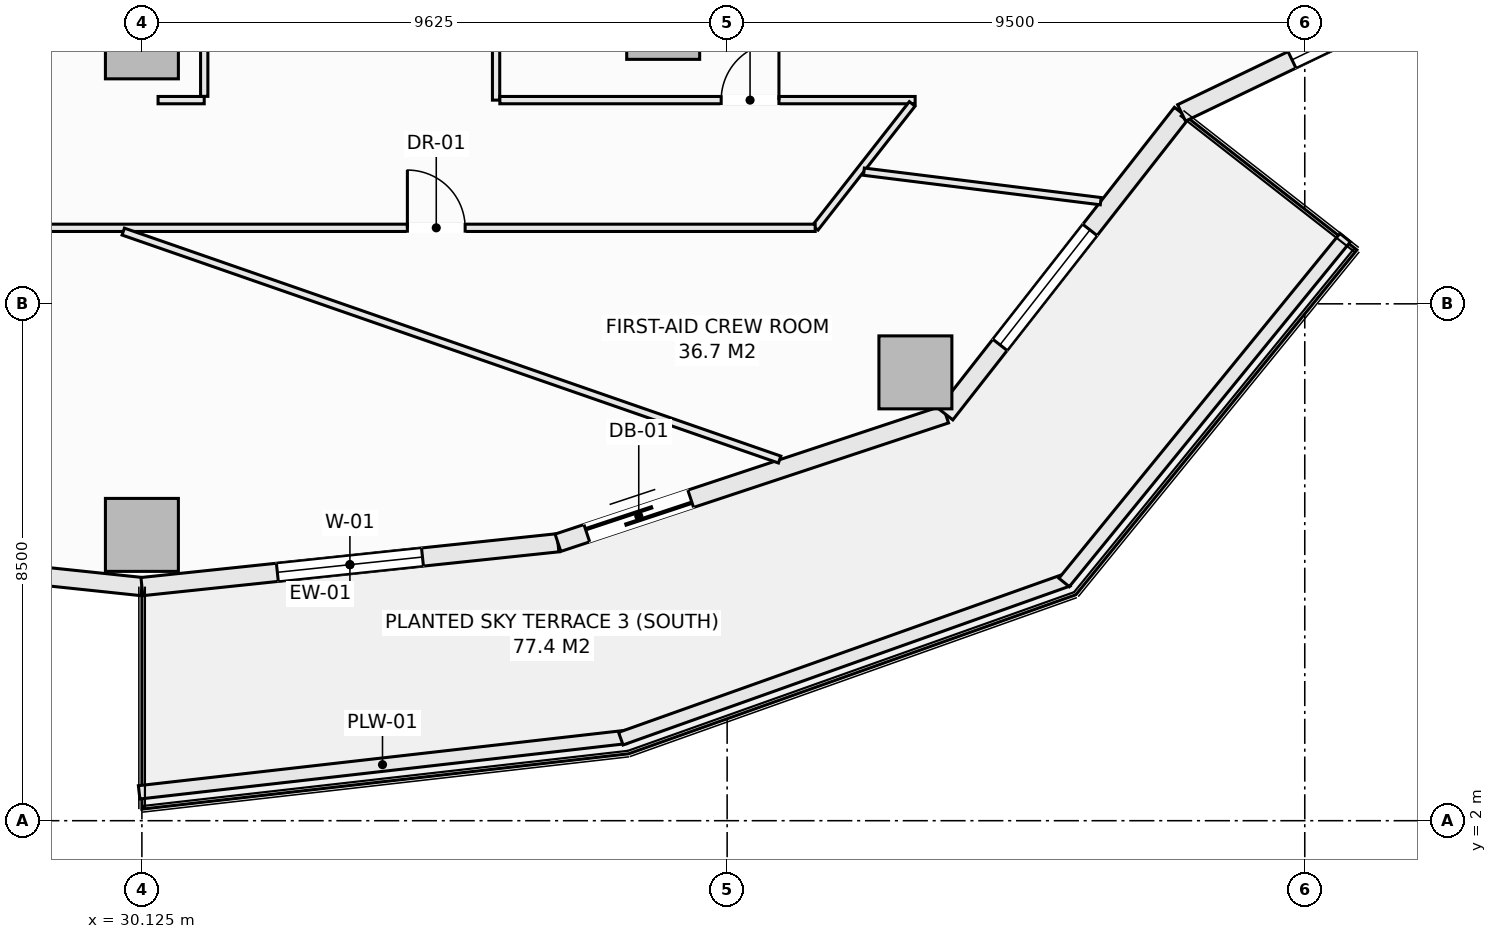
"""IFC4 building model, lengths in metres.
Left out: names, types, materials, properties, quantities, classifications, styles, units other than length and angle.
Written with IfcOpenShell. Run it as: python <this file> out.ifc"""

import sys

from ifc_helpers import new_model, si_unit, direction, frame, frame_2d, origin, origin_2d, place, context, subcontext, project, spatial, rectangle, extrude, element, fill, save


model = new_model("IFC4")
c1 = context("Model", 3, precision=1e-05, world=origin(), true_north=direction((0.0, 1.0)))
c2 = subcontext(c1, "Body", "Model", "MODEL_VIEW")
j1 = project(units=[si_unit("LENGTHUNIT", "METRE"), si_unit("PLANEANGLEUNIT", "RADIAN")], contexts=[c1])
p1 = place(None, origin())
s1 = spatial("IfcSite", under=j1, at=p1, CompositionType="ELEMENT")
p2 = place(p1, origin())
s2 = spatial("IfcBuilding", under=s1, at=p2, CompositionType="ELEMENT")
p3 = place(p2, frame((0.0, 0.0, 80.4)))
s3 = spatial("IfcBuildingStorey", under=s2, at=p3, CompositionType="ELEMENT", Elevation=80.4)
for number, where, z_axis, x_axis in (
    (1, (30.125, 6.7, -0.28), (0.0, 0.0, 1.0), (1.0, 0.0, 0.0)),
    (2, (42.846, 9.373, -0.28), (0.0, 0.0, 1.0), (1.0, 0.0, 0.0)),
    (3, (30.125, 14.8, -0.28), (0.0, 0.0, 1.0), (1.0, 0.0, 0.0)),
    (4, (38.698, 15.121, -0.28), (0.0, 0.0, 1.0), (1.0, 0.0, 0.0)),
):
    element("IfcColumn", number, at=place(p3, frame(where, z_axis=z_axis, x_axis=x_axis)), inside=s3, PredefinedType="COLUMN", context=c2, shape_type="SweptSolid", body=[
        extrude(rectangle(XDim=1.2, YDim=1.2, at=origin_2d()), origin(), (0.0, 0.0, 1.0), 3.85),
    ])
p4 = place(p3, frame((23.282, 6.571, 0.0), z_axis=(0.0, 0.0, 1.0), x_axis=(0.994498840295, -0.104747585419, 0.0)))
e5 = element("IfcWall", 5, at=p4, inside=s3, PredefinedType="SOLIDWALL", context=c2, shape_type="SweptSolid", body=[
    extrude(rectangle(XDim=6.88, YDim=0.3, at=frame_2d((3.44, 0.0))), origin(), (0.0, 0.0, 1.0), 3.093),
])
p5 = place(p4, frame((2.24, 0.0, 0.85)))
e6 = element("IfcOpeningElement", 6, at=p5, cuts=e5, PredefinedType="OPENING", context=c2, shape_type="SweptSolid", body=[
    extrude(rectangle(XDim=2.4, YDim=1.9, at=frame_2d((1.2, 0.95))), frame((0.0, 0.16, 0.0), z_axis=(0.0, -1.0, 0.0), x_axis=(1.0, 0.0, 0.0)), (0.0, 0.0, 1.0), 0.32),
])
p6 = place(p3, frame((30.125, 5.85, 0.0), z_axis=(0.0, 0.0, 1.0), x_axis=(0.994498840295, 0.104747585419, 0.0)))
e7 = element("IfcWall", 7, at=p6, inside=s3, PredefinedType="SOLIDWALL", context=c2, shape_type="SweptSolid", body=[
    extrude(rectangle(XDim=6.88, YDim=0.3, at=frame_2d((3.44, 0.0))), origin(), (0.0, 0.0, 1.0), 3.093),
])
p7 = place(p6, frame((2.24, 0.0, 0.85)))
e8 = element("IfcOpeningElement", 8, at=p7, cuts=e7, PredefinedType="OPENING", context=c2, shape_type="SweptSolid", body=[
    extrude(rectangle(XDim=2.4, YDim=1.9, at=frame_2d((1.2, 0.95))), frame((0.0, 0.16, 0.0), z_axis=(0.0, -1.0, 0.0), x_axis=(1.0, 0.0, 0.0)), (0.0, 0.0, 1.0), 0.32),
])
p8 = place(p3, frame((36.968, 6.571, 0.0), z_axis=(0.0, 0.0, 1.0), x_axis=(0.949245153629, 0.314537181127, 0.0)))
e9 = element("IfcWall", 9, at=p8, inside=s3, PredefinedType="SOLIDWALL", context=c2, shape_type="SweptSolid", body=[
    extrude(rectangle(XDim=6.717, YDim=0.3, at=frame_2d((3.358, 0.0))), origin(), (0.0, 0.0, 1.0), 3.093),
])
p9 = place(p8, frame((0.5, 0.0, 0.0)))
e10 = element("IfcOpeningElement", 10, at=p9, cuts=e9, PredefinedType="OPENING", context=c2, shape_type="SweptSolid", body=[
    extrude(rectangle(XDim=1.8, YDim=2.25, at=frame_2d((0.9, 1.125))), frame((0.0, 0.16, 0.0), z_axis=(0.0, -1.0, 0.0), x_axis=(1.0, 0.0, 0.0)), (0.0, 0.0, 1.0), 0.32),
])
p10 = place(p3, frame((43.344, 8.684, 0.0), z_axis=(0.0, 0.0, 1.0), x_axis=(0.616434798832, 0.78740595552, 0.0)))
e11 = element("IfcWall", 11, at=p10, inside=s3, PredefinedType="SOLIDWALL", context=c2, shape_type="SweptSolid", body=[
    extrude(rectangle(XDim=6.294, YDim=0.3, at=frame_2d((3.147, 0.0))), origin(), (0.0, 0.0, 1.0), 3.093),
])
p11 = place(p10, frame((1.45, 0.0, 0.85)))
e12 = element("IfcOpeningElement", 12, at=p11, cuts=e11, PredefinedType="OPENING", context=c2, shape_type="SweptSolid", body=[
    extrude(rectangle(XDim=2.4, YDim=1.9, at=frame_2d((1.2, 0.95))), frame((0.0, 0.16, 0.0), z_axis=(0.0, -1.0, 0.0), x_axis=(1.0, 0.0, 0.0)), (0.0, 0.0, 1.0), 0.32),
])
p12 = place(p3, frame((47.224, 13.64, 0.0), z_axis=(0.0, 0.0, 1.0), x_axis=(0.901354747727, 0.433081538224, 0.0)))
e13 = element("IfcWall", 13, at=p12, inside=s3, PredefinedType="SOLIDWALL", context=c2, shape_type="SweptSolid", body=[
    extrude(rectangle(XDim=6.431, YDim=0.3, at=frame_2d((3.215, 0.0))), origin(), (0.0, 0.0, 1.0), 3.093),
])
p13 = place(p12, frame((2.015, 0.0, 0.85)))
e14 = element("IfcOpeningElement", 14, at=p13, cuts=e13, PredefinedType="OPENING", context=c2, shape_type="SweptSolid", body=[
    extrude(rectangle(XDim=2.4, YDim=1.9, at=frame_2d((1.2, 0.95))), frame((0.0, 0.16, 0.0), z_axis=(0.0, -1.0, 0.0), x_axis=(1.0, 0.0, 0.0)), (0.0, 0.0, 1.0), 0.32),
])
p14 = place(p3, frame((30.08, 2.466, 0.0), z_axis=(0.0, 0.0, 1.0), x_axis=(0.993598144351, 0.112972242349, 0.0)))
e15 = element("IfcWall", 15, at=p14, inside=s3, PredefinedType="PARAPET", context=c2, shape_type="SweptSolid", body=[
    extrude(rectangle(XDim=8.056, YDim=0.22, at=frame_2d((4.028, 0.0))), origin(), (0.0, 0.0, 1.0), 0.52),
])
p15 = place(p3, frame((38.001, 3.349, 0.0), z_axis=(0.0, 0.0, 1.0), x_axis=(0.942203722205, 0.335040513764, 0.0)))
e16 = element("IfcWall", 16, at=p15, inside=s3, PredefinedType="PARAPET", context=c2, shape_type="SweptSolid", body=[
    extrude(rectangle(XDim=7.807, YDim=0.22, at=frame_2d((3.904, 0.0))), origin(), (0.0, 0.0, 1.0), 0.52),
])
p16 = place(p3, frame((45.292, 5.918, 0.0), z_axis=(0.0, 0.0, 1.0), x_axis=(0.631819273026, 0.775115737315, 0.0)))
e17 = element("IfcWall", 17, at=p16, inside=s3, PredefinedType="PARAPET", context=c2, shape_type="SweptSolid", body=[
    extrude(rectangle(XDim=7.316, YDim=0.22, at=frame_2d((3.658, 0.0))), origin(), (0.0, 0.0, 1.0), 0.52),
])
p17 = place(p3, frame((35.95, 13.85, 0.0), z_axis=(0.0, 0.0, 1.0), x_axis=(0.0, 1.0, 0.0)))
e18 = element("IfcWall", 18, at=p17, inside=s3, PredefinedType="PARTITIONING", context=c2, shape_type="SweptSolid", body=[
    extrude(rectangle(XDim=1.738, YDim=0.12, at=frame_2d((0.869, 0.0))), origin(), (0.0, 0.0, 1.0), 3.57),
])
p18 = place(p3, frame((30.391, 13.85, 0.0), z_axis=(0.0, 0.0, 1.0), x_axis=(1.0, 0.0, 0.0)))
e19 = element("IfcWall", 19, at=p18, inside=s3, PredefinedType="PARTITIONING", context=c2, shape_type="SweptSolid", body=[
    extrude(rectangle(XDim=0.759, YDim=0.12, at=frame_2d((0.379, 0.0))), origin(), (0.0, 0.0, 1.0), 3.57),
])
p19 = place(p3, frame((36.012, 13.85, 0.0), z_axis=(0.0, 0.0, 1.0), x_axis=(1.0, 0.0, 0.0)))
e20 = element("IfcWall", 20, at=p19, inside=s3, PredefinedType="PARTITIONING", context=c2, shape_type="SweptSolid", body=[
    extrude(rectangle(XDim=6.83, YDim=0.12, at=frame_2d((3.415, 0.0))), origin(), (0.0, 0.0, 1.0), 3.57),
])
p20 = place(p19, frame((3.64, 0.0, 0.0)))
e21 = element("IfcOpeningElement", 21, at=p20, cuts=e20, PredefinedType="OPENING", context=c2, shape_type="SweptSolid", body=[
    extrude(rectangle(XDim=0.95, YDim=2.1, at=frame_2d((0.475, 1.05))), frame((0.0, 0.07, 0.0), z_axis=(0.0, -1.0, 0.0), x_axis=(1.0, 0.0, 0.0)), (0.0, 0.0, 1.0), 0.14),
])
p21 = place(p3, frame((41.198, 11.75, 0.0), z_axis=(0.0, 0.0, 1.0), x_axis=(0.616412533256, 0.787423386016, 0.0)))
e22 = element("IfcWall", 22, at=p21, inside=s3, PredefinedType="PARTITIONING", context=c2, shape_type="SweptSolid", body=[
    extrude(rectangle(XDim=2.588, YDim=0.12, at=frame_2d((1.294, 0.0))), origin(), (0.0, 0.0, 1.0), 3.57),
])
p22 = place(p3, frame((23.4, 11.75, 0.0), z_axis=(0.0, 0.0, 1.0), x_axis=(1.0, 0.0, 0.0)))
e23 = element("IfcWall", 23, at=p22, inside=s3, PredefinedType="PARTITIONING", context=c2, shape_type="SweptSolid", body=[
    extrude(rectangle(XDim=17.798, YDim=0.12, at=frame_2d((8.899, 0.0))), origin(), (0.0, 0.0, 1.0), 3.57),
])
p23 = place(p22, frame((3.094, 0.0, 0.0)))
e24 = element("IfcOpeningElement", 24, at=p23, cuts=e23, PredefinedType="OPENING", context=c2, shape_type="SweptSolid", body=[
    extrude(rectangle(XDim=0.95, YDim=2.1, at=frame_2d((0.475, 1.05))), frame((0.0, 0.07, 0.0), z_axis=(0.0, -1.0, 0.0), x_axis=(1.0, 0.0, 0.0)), (0.0, 0.0, 1.0), 0.14),
])
p24 = place(p22, frame((11.091, 0.0, 0.0)))
e25 = element("IfcOpeningElement", 25, at=p24, cuts=e23, PredefinedType="OPENING", context=c2, shape_type="SweptSolid", body=[
    extrude(rectangle(XDim=0.95, YDim=2.1, at=frame_2d((0.475, 1.05))), frame((0.0, 0.07, 0.0), z_axis=(0.0, -1.0, 0.0), x_axis=(1.0, 0.0, 0.0)), (0.0, 0.0, 1.0), 0.14),
])
p25 = place(p3, frame((31.15, 13.912, 0.0), z_axis=(0.0, 0.0, 1.0), x_axis=(0.0, 1.0, 0.0)))
e26 = element("IfcWall", 26, at=p25, inside=s3, PredefinedType="PARTITIONING", context=c2, shape_type="SweptSolid", body=[
    extrude(rectangle(XDim=1.676, YDim=0.12, at=frame_2d((0.838, 0.0))), origin(), (0.0, 0.0, 1.0), 3.57),
])
p26 = place(p3, frame((42.0, 12.674, 0.0), z_axis=(0.0, 0.0, 1.0), x_axis=(0.992316110302, -0.123728481908, 0.0)))
e27 = element("IfcWall", 27, at=p26, inside=s3, PredefinedType="PARTITIONING", context=c2, shape_type="SweptSolid", body=[
    extrude(rectangle(XDim=3.925, YDim=0.12, at=frame_2d((1.962, 0.0))), origin(), (0.0, 0.0, 1.0), 3.57),
])
p27 = place(p3, frame((29.818, 11.688, 0.0), z_axis=(0.0, 0.0, 1.0), x_axis=(0.944668147769, -0.328027575961, 0.0)))
e28 = element("IfcWall", 28, at=p27, inside=s3, PredefinedType="PARTITIONING", context=c2, shape_type="SweptSolid", body=[
    extrude(rectangle(XDim=11.428, YDim=0.12, at=frame_2d((5.714, 0.0))), origin(), (0.0, 0.0, 1.0), 3.093),
])
p28 = place(p7, origin())
e29 = element("IfcWindow", 29, at=p28, inside=s3, PartitioningType="SINGLE_PANEL", PredefinedType="WINDOW", context=c2, shape_type="SweptSolid", body=[
    extrude(rectangle(XDim=2.4, YDim=1.9, at=frame_2d((1.2, 0.95))), frame((0.0, 0.03, 0.0), z_axis=(0.0, -1.0, 0.0), x_axis=(1.0, 0.0, 0.0)), (0.0, 0.0, 1.0), 0.06),
])
fill(e8, e29)
p29 = place(p9, frame((1.8, 0.0, 0.0), z_axis=(0.0, 0.0, 1.0), x_axis=(-1.0, 0.0, 0.0)))
e30 = element("IfcDoor", 30, at=p29, inside=s3, OperationType="SLIDING_TO_LEFT", PredefinedType="DOOR", context=c2, shape_type="SweptSolid", body=[
    extrude(rectangle(XDim=1.8, YDim=2.25, at=frame_2d((0.9, 1.125))), frame((0.0, 0.025, 0.0), z_axis=(0.0, -1.0, 0.0), x_axis=(1.0, 0.0, 0.0)), (0.0, 0.0, 1.0), 0.05),
])
fill(e10, e30)
p30 = place(p11, origin())
e31 = element("IfcWindow", 31, at=p30, inside=s3, PartitioningType="SINGLE_PANEL", PredefinedType="WINDOW", context=c2, shape_type="SweptSolid", body=[
    extrude(rectangle(XDim=2.4, YDim=1.9, at=frame_2d((1.2, 0.95))), frame((0.0, 0.03, 0.0), z_axis=(0.0, -1.0, 0.0), x_axis=(1.0, 0.0, 0.0)), (0.0, 0.0, 1.0), 0.06),
])
fill(e12, e31)
p31 = place(p13, origin())
e32 = element("IfcWindow", 32, at=p31, inside=s3, PartitioningType="SINGLE_PANEL", PredefinedType="WINDOW", context=c2, shape_type="SweptSolid", body=[
    extrude(rectangle(XDim=2.4, YDim=1.9, at=frame_2d((1.2, 0.95))), frame((0.0, 0.03, 0.0), z_axis=(0.0, -1.0, 0.0), x_axis=(1.0, 0.0, 0.0)), (0.0, 0.0, 1.0), 0.06),
])
fill(e14, e32)
p32 = place(p24, origin())
e33 = element("IfcDoor", 33, at=p32, inside=s3, OperationType="SINGLE_SWING_LEFT", PredefinedType="DOOR", context=c2, shape_type="SweptSolid", body=[
    extrude(rectangle(XDim=0.95, YDim=2.1, at=frame_2d((0.475, 1.05))), frame((0.0, 0.025, 0.0), z_axis=(0.0, -1.0, 0.0), x_axis=(1.0, 0.0, 0.0)), (0.0, 0.0, 1.0), 0.05),
])
fill(e25, e33)
p33 = place(p20, origin())
e34 = element("IfcDoor", 34, at=p33, inside=s3, OperationType="SINGLE_SWING_RIGHT", PredefinedType="DOOR", context=c2, shape_type="SweptSolid", body=[
    extrude(rectangle(XDim=0.95, YDim=2.1, at=frame_2d((0.475, 1.05))), frame((0.0, 0.025, 0.0), z_axis=(0.0, -1.0, 0.0), x_axis=(1.0, 0.0, 0.0)), (0.0, 0.0, 1.0), 0.05),
])
fill(e21, e34)
save(model, sys.argv[1])
